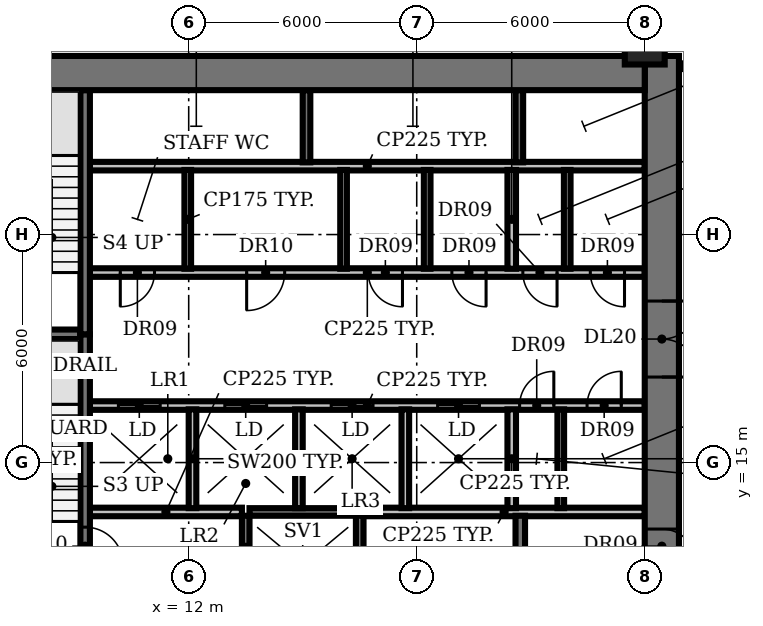
"""IFC4 building model, lengths in metres.
Left out: names, types, materials, properties, quantities, classifications, styles, units other than length and angle.
Written with IfcOpenShell. Run it as: python <this file> out.ifc"""

import sys

from ifc_helpers import new_model, si_unit, direction, frame, frame_2d, origin, origin_2d, place, context, subcontext, project, spatial, rectangle, circle, extrude, element, fill, save


model = new_model("IFC4")
c1 = context("Model", 3, precision=1e-05, world=origin(), true_north=direction((0.0, 1.0)))
c2 = subcontext(c1, "Body", "Model", "MODEL_VIEW")
j1 = project(units=[si_unit("LENGTHUNIT", "METRE"), si_unit("PLANEANGLEUNIT", "RADIAN")], contexts=[c1])
p1 = place(None, origin())
s1 = spatial("IfcSite", under=j1, at=p1, CompositionType="ELEMENT")
p2 = place(p1, origin())
s2 = spatial("IfcBuilding", under=s1, at=p2, CompositionType="ELEMENT")
p3 = place(p2, frame((0.0, 0.0, 33.2)))
s3 = spatial("IfcBuildingStorey", under=s2, at=p3, CompositionType="ELEMENT", Elevation=33.2)
p4 = place(p3, frame((24.0, 26.0, 0.0), z_axis=(0.0, 0.0, 1.0), x_axis=(1.0, 0.0, 0.0)))
e1 = element("IfcColumn", 1, at=p4, inside=s3, PredefinedType="COLUMN", context=c2, shape_type="SweptSolid", body=[
    extrude(circle(Radius=0.525, at=origin_2d()), origin(), (0.0, 0.0, 1.0), 3.85),
])
p5 = place(p3, frame((9.4, 13.7, 0.0), z_axis=(0.0, 0.0, 1.0), x_axis=(1.0, 0.0, 0.0)))
e2 = element("IfcWall", 2, at=p5, inside=s3, PredefinedType="PARTITIONING", context=c2, shape_type="SweptSolid", body=[
    extrude(rectangle(XDim=4.0, YDim=0.225, at=frame_2d((2.0, 0.0))), origin(), (0.0, 0.0, 1.0), 3.85),
])
p6 = place(p3, frame((13.6, 13.7, 0.0), z_axis=(0.0, 0.0, 1.0), x_axis=(1.0, 0.0, 0.0)))
e3 = element("IfcWall", 3, at=p6, inside=s3, PredefinedType="SHEAR", context=c2, shape_type="SweptSolid", body=[
    extrude(rectangle(XDim=2.8, YDim=0.2, at=frame_2d((1.4, 0.0))), origin(), (0.0, 0.0, 1.0), 3.85),
])
p7 = place(p3, frame((16.6, 13.7, 0.0), z_axis=(0.0, 0.0, 1.0), x_axis=(1.0, 0.0, 0.0)))
e4 = element("IfcWall", 4, at=p7, inside=s3, PredefinedType="PARTITIONING", context=c2, shape_type="SweptSolid", body=[
    extrude(rectangle(XDim=7.4, YDim=0.225, at=frame_2d((3.7, 0.0))), origin(), (0.0, 0.0, 1.0), 3.85),
])
p8 = place(p3, frame((9.4, 16.5, 0.0), z_axis=(0.0, 0.0, 1.0), x_axis=(1.0, 0.0, 0.0)))
e5 = element("IfcWall", 5, at=p8, inside=s3, PredefinedType="PARTITIONING", context=c2, shape_type="SweptSolid", body=[
    extrude(rectangle(XDim=14.6, YDim=0.225, at=frame_2d((7.3, 0.0))), origin(), (0.0, 0.0, 1.0), 3.85),
])
p9 = place(p8, frame((0.75, 0.0, 0.0)))
e6 = element("IfcOpeningElement", 6, at=p9, cuts=e5, PredefinedType="OPENING", context=c2, shape_type="SweptSolid", body=[
    extrude(rectangle(XDim=1.1, YDim=2.1, at=frame_2d((0.55, 1.05))), frame((0.0, 0.123, 0.0), z_axis=(0.0, -1.0, 0.0), x_axis=(1.0, 0.0, 0.0)), (0.0, 0.0, 1.0), 0.245),
])
p10 = place(p8, frame((3.55, 0.0, 0.0)))
e7 = element("IfcOpeningElement", 7, at=p10, cuts=e5, PredefinedType="OPENING", context=c2, shape_type="SweptSolid", body=[
    extrude(rectangle(XDim=1.1, YDim=2.1, at=frame_2d((0.55, 1.05))), frame((0.0, 0.123, 0.0), z_axis=(0.0, -1.0, 0.0), x_axis=(1.0, 0.0, 0.0)), (0.0, 0.0, 1.0), 0.245),
])
p11 = place(p8, frame((6.35, 0.0, 0.0)))
e8 = element("IfcOpeningElement", 8, at=p11, cuts=e5, PredefinedType="OPENING", context=c2, shape_type="SweptSolid", body=[
    extrude(rectangle(XDim=1.1, YDim=2.1, at=frame_2d((0.55, 1.05))), frame((0.0, 0.123, 0.0), z_axis=(0.0, -1.0, 0.0), x_axis=(1.0, 0.0, 0.0)), (0.0, 0.0, 1.0), 0.245),
])
p12 = place(p8, frame((9.15, 0.0, 0.0)))
e9 = element("IfcOpeningElement", 9, at=p12, cuts=e5, PredefinedType="OPENING", context=c2, shape_type="SweptSolid", body=[
    extrude(rectangle(XDim=1.1, YDim=2.1, at=frame_2d((0.55, 1.05))), frame((0.0, 0.123, 0.0), z_axis=(0.0, -1.0, 0.0), x_axis=(1.0, 0.0, 0.0)), (0.0, 0.0, 1.0), 0.245),
])
p13 = place(p8, frame((11.308, 0.0, 0.0)))
e10 = element("IfcOpeningElement", 10, at=p13, cuts=e5, PredefinedType="OPENING", context=c2, shape_type="SweptSolid", body=[
    extrude(rectangle(XDim=0.9, YDim=2.1, at=frame_2d((0.45, 1.05))), frame((0.0, 0.123, 0.0), z_axis=(0.0, -1.0, 0.0), x_axis=(1.0, 0.0, 0.0)), (0.0, 0.0, 1.0), 0.245),
])
p14 = place(p8, frame((13.083, 0.0, 0.0)))
e11 = element("IfcOpeningElement", 11, at=p14, cuts=e5, PredefinedType="OPENING", context=c2, shape_type="SweptSolid", body=[
    extrude(rectangle(XDim=0.9, YDim=2.1, at=frame_2d((0.45, 1.05))), frame((0.0, 0.123, 0.0), z_axis=(0.0, -1.0, 0.0), x_axis=(1.0, 0.0, 0.0)), (0.0, 0.0, 1.0), 0.245),
])
p15 = place(p3, frame((6.0, 18.375, 0.0), z_axis=(0.0, 0.0, 1.0), x_axis=(1.0, 0.0, 0.0)))
e12 = element("IfcWall", 12, at=p15, inside=s3, PredefinedType="SHEAR", context=c2, shape_type="SweptSolid", body=[
    extrude(rectangle(XDim=3.15, YDim=0.25, at=frame_2d((1.575, 0.0))), origin(), (0.0, 0.0, 1.0), 3.85),
])
p16 = place(p3, frame((24.0, 20.0, 0.0), z_axis=(0.0, 0.0, 1.0), x_axis=(-1.0, 0.0, 0.0)))
e13 = element("IfcWall", 13, at=p16, inside=s3, PredefinedType="PARTITIONING", context=c2, shape_type="SweptSolid", body=[
    extrude(rectangle(XDim=14.6, YDim=0.225, at=frame_2d((7.3, 0.0))), origin(), (0.0, 0.0, 1.0), 3.85),
])
p17 = place(p16, frame((12.9, 0.0, 0.0)))
e14 = element("IfcOpeningElement", 14, at=p17, cuts=e13, PredefinedType="OPENING", context=c2, shape_type="SweptSolid", body=[
    extrude(rectangle(XDim=0.9, YDim=2.1, at=frame_2d((0.45, 1.05))), frame((0.0, 0.123, 0.0), z_axis=(0.0, -1.0, 0.0), x_axis=(1.0, 0.0, 0.0)), (0.0, 0.0, 1.0), 0.245),
])
p18 = place(p16, frame((9.475, 0.0, 0.0)))
e15 = element("IfcOpeningElement", 15, at=p18, cuts=e13, PredefinedType="OPENING", context=c2, shape_type="SweptSolid", body=[
    extrude(rectangle(XDim=1.0, YDim=2.1, at=frame_2d((0.5, 1.05))), frame((0.0, 0.123, 0.0), z_axis=(0.0, -1.0, 0.0), x_axis=(1.0, 0.0, 0.0)), (0.0, 0.0, 1.0), 0.245),
])
p19 = place(p16, frame((6.375, 0.0, 0.0)))
e16 = element("IfcOpeningElement", 16, at=p19, cuts=e13, PredefinedType="OPENING", context=c2, shape_type="SweptSolid", body=[
    extrude(rectangle(XDim=0.9, YDim=2.1, at=frame_2d((0.45, 1.05))), frame((0.0, 0.123, 0.0), z_axis=(0.0, -1.0, 0.0), x_axis=(1.0, 0.0, 0.0)), (0.0, 0.0, 1.0), 0.245),
])
p20 = place(p16, frame((4.175, 0.0, 0.0)))
e17 = element("IfcOpeningElement", 17, at=p20, cuts=e13, PredefinedType="OPENING", context=c2, shape_type="SweptSolid", body=[
    extrude(rectangle(XDim=0.9, YDim=2.1, at=frame_2d((0.45, 1.05))), frame((0.0, 0.123, 0.0), z_axis=(0.0, -1.0, 0.0), x_axis=(1.0, 0.0, 0.0)), (0.0, 0.0, 1.0), 0.245),
])
p21 = place(p16, frame((2.308, 0.0, 0.0)))
e18 = element("IfcOpeningElement", 18, at=p21, cuts=e13, PredefinedType="OPENING", context=c2, shape_type="SweptSolid", body=[
    extrude(rectangle(XDim=0.9, YDim=2.1, at=frame_2d((0.45, 1.05))), frame((0.0, 0.123, 0.0), z_axis=(0.0, -1.0, 0.0), x_axis=(1.0, 0.0, 0.0)), (0.0, 0.0, 1.0), 0.245),
])
p22 = place(p16, frame((0.532, 0.0, 0.0)))
e19 = element("IfcOpeningElement", 19, at=p22, cuts=e13, PredefinedType="OPENING", context=c2, shape_type="SweptSolid", body=[
    extrude(rectangle(XDim=0.9, YDim=2.1, at=frame_2d((0.45, 1.05))), frame((0.0, 0.123, 0.0), z_axis=(0.0, -1.0, 0.0), x_axis=(1.0, 0.0, 0.0)), (0.0, 0.0, 1.0), 0.245),
])
p23 = place(p3, frame((9.4, 22.8, 0.0), z_axis=(0.0, 0.0, 1.0), x_axis=(1.0, 0.0, 0.0)))
e20 = element("IfcWall", 20, at=p23, inside=s3, PredefinedType="PARTITIONING", context=c2, shape_type="SweptSolid", body=[
    extrude(rectangle(XDim=14.6, YDim=0.225, at=frame_2d((7.3, 0.0))), origin(), (0.0, 0.0, 1.0), 3.85),
])
p24 = place(p3, frame((9.275, 18.375, 0.0), z_axis=(0.0, 0.0, 1.0), x_axis=(0.0, -1.0, 0.0)))
e21 = element("IfcWall", 21, at=p24, inside=s3, PredefinedType="SHEAR", context=c2, shape_type="SweptSolid", body=[
    extrude(rectangle(XDim=6.55, YDim=0.25, at=frame_2d((3.275, 0.0))), origin(), (0.0, 0.0, 1.0), 3.85),
])
p25 = place(p24, frame((5.075, 0.0, 0.0)))
e22 = element("IfcOpeningElement", 22, at=p25, cuts=e21, PredefinedType="OPENING", context=c2, shape_type="SweptSolid", body=[
    extrude(rectangle(XDim=1.0, YDim=2.1, at=frame_2d((0.5, 1.05))), frame((0.0, 0.135, 0.0), z_axis=(0.0, -1.0, 0.0), x_axis=(1.0, 0.0, 0.0)), (0.0, 0.0, 1.0), 0.27),
])
p26 = place(p3, frame((9.275, 18.375, 0.0), z_axis=(0.0, 0.0, 1.0), x_axis=(0.0, 1.0, 0.0)))
e23 = element("IfcWall", 23, at=p26, inside=s3, PredefinedType="SHEAR", context=c2, shape_type="SweptSolid", body=[
    extrude(rectangle(XDim=6.425, YDim=0.25, at=frame_2d((3.212, 0.0))), origin(), (0.0, 0.0, 1.0), 3.85),
])
p27 = place(p3, frame((11.975, 20.1, 0.0), z_axis=(0.0, 0.0, 1.0), x_axis=(0.0, 1.0, 0.0)))
e24 = element("IfcWall", 24, at=p27, inside=s3, PredefinedType="PARTITIONING", context=c2, shape_type="SweptSolid", body=[
    extrude(rectangle(XDim=2.6, YDim=0.175, at=frame_2d((1.3, 0.0))), origin(), (0.0, 0.0, 1.0), 3.85),
])
p28 = place(p3, frame((12.1, 13.8, 0.0), z_axis=(0.0, 0.0, 1.0), x_axis=(0.0, 1.0, 0.0)))
e25 = element("IfcWall", 25, at=p28, inside=s3, PredefinedType="SOLIDWALL", context=c2, shape_type="SweptSolid", body=[
    extrude(rectangle(XDim=2.6, YDim=0.2, at=frame_2d((1.3, 0.0))), origin(), (0.0, 0.0, 1.0), 3.85),
])
p29 = place(p3, frame((13.5, 5.4, 0.0), z_axis=(0.0, 0.0, 1.0), x_axis=(0.0, 1.0, 0.0)))
e26 = element("IfcWall", 26, at=p29, inside=s3, PredefinedType="SHEAR", context=c2, shape_type="SweptSolid", body=[
    extrude(rectangle(XDim=8.2, YDim=0.2, at=frame_2d((4.1, 0.0))), origin(), (0.0, 0.0, 1.0), 3.85),
])
p30 = place(p29, frame((0.75, 0.0, 0.0)))
e27 = element("IfcOpeningElement", 27, at=p30, cuts=e26, PredefinedType="OPENING", context=c2, shape_type="SweptSolid", body=[
    extrude(rectangle(XDim=1.1, YDim=2.1, at=frame_2d((0.55, 1.05))), frame((0.0, 0.11, 0.0), z_axis=(0.0, -1.0, 0.0), x_axis=(1.0, 0.0, 0.0)), (0.0, 0.0, 1.0), 0.22),
])
p31 = place(p29, frame((3.55, 0.0, 0.0)))
e28 = element("IfcOpeningElement", 28, at=p31, cuts=e26, PredefinedType="OPENING", context=c2, shape_type="SweptSolid", body=[
    extrude(rectangle(XDim=1.1, YDim=2.1, at=frame_2d((0.55, 1.05))), frame((0.0, 0.11, 0.0), z_axis=(0.0, -1.0, 0.0), x_axis=(1.0, 0.0, 0.0)), (0.0, 0.0, 1.0), 0.22),
])
p32 = place(p29, frame((6.35, 0.0, 0.0)))
e29 = element("IfcOpeningElement", 29, at=p32, cuts=e26, PredefinedType="OPENING", context=c2, shape_type="SweptSolid", body=[
    extrude(rectangle(XDim=1.1, YDim=2.1, at=frame_2d((0.55, 1.05))), frame((0.0, 0.11, 0.0), z_axis=(0.0, -1.0, 0.0), x_axis=(1.0, 0.0, 0.0)), (0.0, 0.0, 1.0), 0.22),
])
p33 = place(p3, frame((14.9, 13.8, 0.0), z_axis=(0.0, 0.0, 1.0), x_axis=(0.0, 1.0, 0.0)))
e30 = element("IfcWall", 30, at=p33, inside=s3, PredefinedType="SOLIDWALL", context=c2, shape_type="SweptSolid", body=[
    extrude(rectangle(XDim=2.6, YDim=0.2, at=frame_2d((1.3, 0.0))), origin(), (0.0, 0.0, 1.0), 3.85),
])
p34 = place(p3, frame((15.1, 22.9, 0.0), z_axis=(0.0, 0.0, 1.0), x_axis=(0.0, 1.0, 0.0)))
e31 = element("IfcWall", 31, at=p34, inside=s3, PredefinedType="SHEAR", context=c2, shape_type="SweptSolid", body=[
    extrude(rectangle(XDim=1.9, YDim=0.2, at=frame_2d((0.95, 0.0))), origin(), (0.0, 0.0, 1.0), 3.85),
])
p35 = place(p3, frame((16.075, 20.1, 0.0), z_axis=(0.0, 0.0, 1.0), x_axis=(0.0, 1.0, 0.0)))
e32 = element("IfcWall", 32, at=p35, inside=s3, PredefinedType="PARTITIONING", context=c2, shape_type="SweptSolid", body=[
    extrude(rectangle(XDim=2.6, YDim=0.175, at=frame_2d((1.3, 0.0))), origin(), (0.0, 0.0, 1.0), 3.85),
])
p36 = place(p3, frame((16.5, 5.4, 0.0), z_axis=(0.0, 0.0, 1.0), x_axis=(0.0, 1.0, 0.0)))
e33 = element("IfcWall", 33, at=p36, inside=s3, PredefinedType="SHEAR", context=c2, shape_type="SweptSolid", body=[
    extrude(rectangle(XDim=8.2, YDim=0.2, at=frame_2d((4.1, 0.0))), origin(), (0.0, 0.0, 1.0), 3.85),
])
p37 = place(p3, frame((17.7, 13.8, 0.0), z_axis=(0.0, 0.0, 1.0), x_axis=(0.0, 1.0, 0.0)))
e34 = element("IfcWall", 34, at=p37, inside=s3, PredefinedType="SOLIDWALL", context=c2, shape_type="SweptSolid", body=[
    extrude(rectangle(XDim=2.6, YDim=0.2, at=frame_2d((1.3, 0.0))), origin(), (0.0, 0.0, 1.0), 3.85),
])
p38 = place(p3, frame((18.275, 20.1, 0.0), z_axis=(0.0, 0.0, 1.0), x_axis=(0.0, 1.0, 0.0)))
e35 = element("IfcWall", 35, at=p38, inside=s3, PredefinedType="PARTITIONING", context=c2, shape_type="SweptSolid", body=[
    extrude(rectangle(XDim=2.6, YDim=0.175, at=frame_2d((1.3, 0.0))), origin(), (0.0, 0.0, 1.0), 3.85),
])
for number, where, z_axis, x_axis in (
    (36, (20.5, 13.8, 0.0), (0.0, 0.0, 1.0), (0.0, 1.0, 0.0)),
    (37, (20.5, 20.1, 0.0), (0.0, 0.0, 1.0), (0.0, 1.0, 0.0)),
):
    element("IfcWall", number, at=place(p3, frame(where, z_axis=z_axis, x_axis=x_axis)), inside=s3, PredefinedType="PARTITIONING", context=c2, shape_type="SweptSolid", body=[
        extrude(rectangle(XDim=2.6, YDim=0.225, at=frame_2d((1.3, 0.0))), origin(), (0.0, 0.0, 1.0), 3.85),
    ])
p39 = place(p3, frame((20.7, 22.9, 0.0), z_axis=(0.0, 0.0, 1.0), x_axis=(0.0, 1.0, 0.0)))
e38 = element("IfcWall", 38, at=p39, inside=s3, PredefinedType="SHEAR", context=c2, shape_type="SweptSolid", body=[
    extrude(rectangle(XDim=1.9, YDim=0.2, at=frame_2d((0.95, 0.0))), origin(), (0.0, 0.0, 1.0), 3.85),
])
p40 = place(p3, frame((20.725, 5.4, 0.0), z_axis=(0.0, 0.0, 1.0), x_axis=(0.0, 1.0, 0.0)))
e39 = element("IfcWall", 39, at=p40, inside=s3, PredefinedType="SHEAR", context=c2, shape_type="SweptSolid", body=[
    extrude(rectangle(XDim=8.2, YDim=0.25, at=frame_2d((4.1, 0.0))), origin(), (0.0, 0.0, 1.0), 3.85),
])
for number, where, z_axis, x_axis in (
    (40, (21.79, 13.8, 0.0), (0.0, 0.0, 1.0), (0.0, 1.0, 0.0)),
    (41, (21.96, 20.1, 0.0), (0.0, 0.0, 1.0), (0.0, 1.0, 0.0)),
):
    element("IfcWall", number, at=place(p3, frame(where, z_axis=z_axis, x_axis=x_axis)), inside=s3, PredefinedType="PARTITIONING", context=c2, shape_type="SweptSolid", body=[
        extrude(rectangle(XDim=2.6, YDim=0.175, at=frame_2d((1.3, 0.0))), origin(), (0.0, 0.0, 1.0), 3.85),
    ])
p41 = place(p3, frame((24.45, 25.7, 0.0), z_axis=(0.0, 0.0, 1.0), x_axis=(0.0, -1.0, 0.0)))
e42 = element("IfcWall", 42, at=p41, inside=s3, PredefinedType="SHEAR", context=c2, shape_type="SweptSolid", body=[
    extrude(rectangle(XDim=21.2, YDim=0.9, at=frame_2d((10.6, 0.0))), origin(), (0.0, 0.0, 1.0), 3.85),
])
p42 = place(p41, frame((18.55, 0.0, 0.0)))
e43 = element("IfcOpeningElement", 43, at=p42, cuts=e42, PredefinedType="OPENING", context=c2, shape_type="SweptSolid", body=[
    extrude(rectangle(XDim=1.5, YDim=2.1, at=frame_2d((0.75, 1.05))), frame((0.0, 0.46, 0.0), z_axis=(0.0, -1.0, 0.0), x_axis=(1.0, 0.0, 0.0)), (0.0, 0.0, 1.0), 0.92),
])
p43 = place(p41, frame((12.45, 0.0, 0.0)))
e44 = element("IfcOpeningElement", 44, at=p43, cuts=e42, PredefinedType="OPENING", context=c2, shape_type="SweptSolid", body=[
    extrude(rectangle(XDim=0.9, YDim=2.1, at=frame_2d((0.45, 1.05))), frame((0.0, 0.46, 0.0), z_axis=(0.0, -1.0, 0.0), x_axis=(1.0, 0.0, 0.0)), (0.0, 0.0, 1.0), 0.92),
])
p44 = place(p41, frame((6.45, 0.0, 0.0)))
e45 = element("IfcOpeningElement", 45, at=p44, cuts=e42, PredefinedType="OPENING", context=c2, shape_type="SweptSolid", body=[
    extrude(rectangle(XDim=2.0, YDim=2.1, at=frame_2d((1.0, 1.05))), frame((0.0, 0.46, 0.0), z_axis=(0.0, -1.0, 0.0), x_axis=(1.0, 0.0, 0.0)), (0.0, 0.0, 1.0), 0.92),
])
p45 = place(p3, frame((6.0, 25.25, 0.0), z_axis=(0.0, 0.0, 1.0), x_axis=(1.0, 0.0, 0.0)))
e46 = element("IfcWall", 46, at=p45, inside=s3, PredefinedType="SHEAR", context=c2, shape_type="SweptSolid", body=[
    extrude(rectangle(XDim=18.0, YDim=0.9, at=frame_2d((9.0, 0.0))), origin(), (0.0, 0.0, 1.0), 3.85),
])
p46 = place(p3, frame((25.0, 25.43, 0.0), z_axis=(0.0, 0.0, 1.0), x_axis=(1.0, 0.0, 0.0)))
e47 = element("IfcWall", 47, at=p46, inside=s3, PredefinedType="PARTITIONING", context=c2, shape_type="SweptSolid", body=[
    extrude(rectangle(XDim=1.158, YDim=0.15, at=frame_2d((0.579, 0.0))), origin(), (0.0, 0.0, 1.0), 2.83),
])
p47 = place(p9, origin())
e48 = element("IfcDoor", 48, at=p47, inside=s3, OperationType="DOUBLE_DOOR_SLIDING", PredefinedType="DOOR", context=c2, shape_type="SweptSolid", body=[
    extrude(rectangle(XDim=1.1, YDim=2.1, at=frame_2d((0.55, 1.05))), frame((0.0, 0.025, 0.0), z_axis=(0.0, -1.0, 0.0), x_axis=(1.0, 0.0, 0.0)), (0.0, 0.0, 1.0), 0.05),
])
fill(e6, e48)
p48 = place(p10, origin())
e49 = element("IfcDoor", 49, at=p48, inside=s3, OperationType="DOUBLE_DOOR_SLIDING", PredefinedType="DOOR", context=c2, shape_type="SweptSolid", body=[
    extrude(rectangle(XDim=1.1, YDim=2.1, at=frame_2d((0.55, 1.05))), frame((0.0, 0.025, 0.0), z_axis=(0.0, -1.0, 0.0), x_axis=(1.0, 0.0, 0.0)), (0.0, 0.0, 1.0), 0.05),
])
fill(e7, e49)
p49 = place(p11, origin())
e50 = element("IfcDoor", 50, at=p49, inside=s3, OperationType="DOUBLE_DOOR_SLIDING", PredefinedType="DOOR", context=c2, shape_type="SweptSolid", body=[
    extrude(rectangle(XDim=1.1, YDim=2.1, at=frame_2d((0.55, 1.05))), frame((0.0, 0.025, 0.0), z_axis=(0.0, -1.0, 0.0), x_axis=(1.0, 0.0, 0.0)), (0.0, 0.0, 1.0), 0.05),
])
fill(e8, e50)
p50 = place(p12, origin())
e51 = element("IfcDoor", 51, at=p50, inside=s3, OperationType="DOUBLE_DOOR_SLIDING", PredefinedType="DOOR", context=c2, shape_type="SweptSolid", body=[
    extrude(rectangle(XDim=1.1, YDim=2.1, at=frame_2d((0.55, 1.05))), frame((0.0, 0.025, 0.0), z_axis=(0.0, -1.0, 0.0), x_axis=(1.0, 0.0, 0.0)), (0.0, 0.0, 1.0), 0.05),
])
fill(e9, e51)
p51 = place(p13, origin())
e52 = element("IfcDoor", 52, at=p51, inside=s3, OperationType="SINGLE_SWING_RIGHT", PredefinedType="DOOR", context=c2, shape_type="SweptSolid", body=[
    extrude(rectangle(XDim=0.9, YDim=2.1, at=frame_2d((0.45, 1.05))), frame((0.0, 0.025, 0.0), z_axis=(0.0, -1.0, 0.0), x_axis=(1.0, 0.0, 0.0)), (0.0, 0.0, 1.0), 0.05),
])
fill(e10, e52)
p52 = place(p14, origin())
e53 = element("IfcDoor", 53, at=p52, inside=s3, OperationType="SINGLE_SWING_RIGHT", PredefinedType="DOOR", context=c2, shape_type="SweptSolid", body=[
    extrude(rectangle(XDim=0.9, YDim=2.1, at=frame_2d((0.45, 1.05))), frame((0.0, 0.025, 0.0), z_axis=(0.0, -1.0, 0.0), x_axis=(1.0, 0.0, 0.0)), (0.0, 0.0, 1.0), 0.05),
])
fill(e11, e53)
p53 = place(p17, origin())
e54 = element("IfcDoor", 54, at=p53, inside=s3, OperationType="SINGLE_SWING_RIGHT", PredefinedType="DOOR", context=c2, shape_type="SweptSolid", body=[
    extrude(rectangle(XDim=0.9, YDim=2.1, at=frame_2d((0.45, 1.05))), frame((0.0, 0.025, 0.0), z_axis=(0.0, -1.0, 0.0), x_axis=(1.0, 0.0, 0.0)), (0.0, 0.0, 1.0), 0.05),
])
fill(e14, e54)
p54 = place(p18, origin())
e55 = element("IfcDoor", 55, at=p54, inside=s3, OperationType="SINGLE_SWING_RIGHT", PredefinedType="DOOR", context=c2, shape_type="SweptSolid", body=[
    extrude(rectangle(XDim=1.0, YDim=2.1, at=frame_2d((0.5, 1.05))), frame((0.0, 0.025, 0.0), z_axis=(0.0, -1.0, 0.0), x_axis=(1.0, 0.0, 0.0)), (0.0, 0.0, 1.0), 0.05),
])
fill(e15, e55)
p55 = place(p19, origin())
e56 = element("IfcDoor", 56, at=p55, inside=s3, OperationType="SINGLE_SWING_LEFT", PredefinedType="DOOR", context=c2, shape_type="SweptSolid", body=[
    extrude(rectangle(XDim=0.9, YDim=2.1, at=frame_2d((0.45, 1.05))), frame((0.0, 0.025, 0.0), z_axis=(0.0, -1.0, 0.0), x_axis=(1.0, 0.0, 0.0)), (0.0, 0.0, 1.0), 0.05),
])
fill(e16, e56)
p56 = place(p20, origin())
e57 = element("IfcDoor", 57, at=p56, inside=s3, OperationType="SINGLE_SWING_LEFT", PredefinedType="DOOR", context=c2, shape_type="SweptSolid", body=[
    extrude(rectangle(XDim=0.9, YDim=2.1, at=frame_2d((0.45, 1.05))), frame((0.0, 0.025, 0.0), z_axis=(0.0, -1.0, 0.0), x_axis=(1.0, 0.0, 0.0)), (0.0, 0.0, 1.0), 0.05),
])
fill(e17, e57)
p57 = place(p21, origin())
e58 = element("IfcDoor", 58, at=p57, inside=s3, OperationType="SINGLE_SWING_LEFT", PredefinedType="DOOR", context=c2, shape_type="SweptSolid", body=[
    extrude(rectangle(XDim=0.9, YDim=2.1, at=frame_2d((0.45, 1.05))), frame((0.0, 0.025, 0.0), z_axis=(0.0, -1.0, 0.0), x_axis=(1.0, 0.0, 0.0)), (0.0, 0.0, 1.0), 0.05),
])
fill(e18, e58)
p58 = place(p22, origin())
e59 = element("IfcDoor", 59, at=p58, inside=s3, OperationType="SINGLE_SWING_LEFT", PredefinedType="DOOR", context=c2, shape_type="SweptSolid", body=[
    extrude(rectangle(XDim=0.9, YDim=2.1, at=frame_2d((0.45, 1.05))), frame((0.0, 0.025, 0.0), z_axis=(0.0, -1.0, 0.0), x_axis=(1.0, 0.0, 0.0)), (0.0, 0.0, 1.0), 0.05),
])
fill(e19, e59)
p59 = place(p25, origin())
e60 = element("IfcDoor", 60, at=p59, inside=s3, OperationType="SINGLE_SWING_RIGHT", PredefinedType="DOOR", context=c2, shape_type="SweptSolid", body=[
    extrude(rectangle(XDim=1.0, YDim=2.1, at=frame_2d((0.5, 1.05))), frame((0.0, 0.025, 0.0), z_axis=(0.0, -1.0, 0.0), x_axis=(1.0, 0.0, 0.0)), (0.0, 0.0, 1.0), 0.05),
])
fill(e22, e60)
p60 = place(p32, origin())
e61 = element("IfcDoor", 61, at=p60, inside=s3, OperationType="DOUBLE_DOOR_SLIDING", PredefinedType="DOOR", context=c2, shape_type="SweptSolid", body=[
    extrude(rectangle(XDim=1.1, YDim=2.1, at=frame_2d((0.55, 1.05))), frame((0.0, 0.025, 0.0), z_axis=(0.0, -1.0, 0.0), x_axis=(1.0, 0.0, 0.0)), (0.0, 0.0, 1.0), 0.05),
])
fill(e29, e61)
p61 = place(p43, origin())
e62 = element("IfcDoor", 62, at=p61, inside=s3, OperationType="SINGLE_SWING_RIGHT", PredefinedType="DOOR", context=c2, shape_type="SweptSolid", body=[
    extrude(rectangle(XDim=0.9, YDim=2.1, at=frame_2d((0.45, 1.05))), frame((0.0, -0.39, 0.0), z_axis=(0.0, -1.0, 0.0), x_axis=(1.0, 0.0, 0.0)), (0.0, 0.0, 1.0), 0.05),
])
fill(e44, e62)
p62 = place(p44, origin())
e63 = element("IfcDoor", 63, at=p62, inside=s3, OperationType="DOUBLE_DOOR_SINGLE_SWING", PredefinedType="DOOR", context=c2, shape_type="SweptSolid", body=[
    extrude(rectangle(XDim=2.0, YDim=2.1, at=frame_2d((1.0, 1.05))), frame((0.0, 0.025, 0.0), z_axis=(0.0, -1.0, 0.0), x_axis=(1.0, 0.0, 0.0)), (0.0, 0.0, 1.0), 0.05),
])
fill(e45, e63)
save(model, sys.argv[1])
